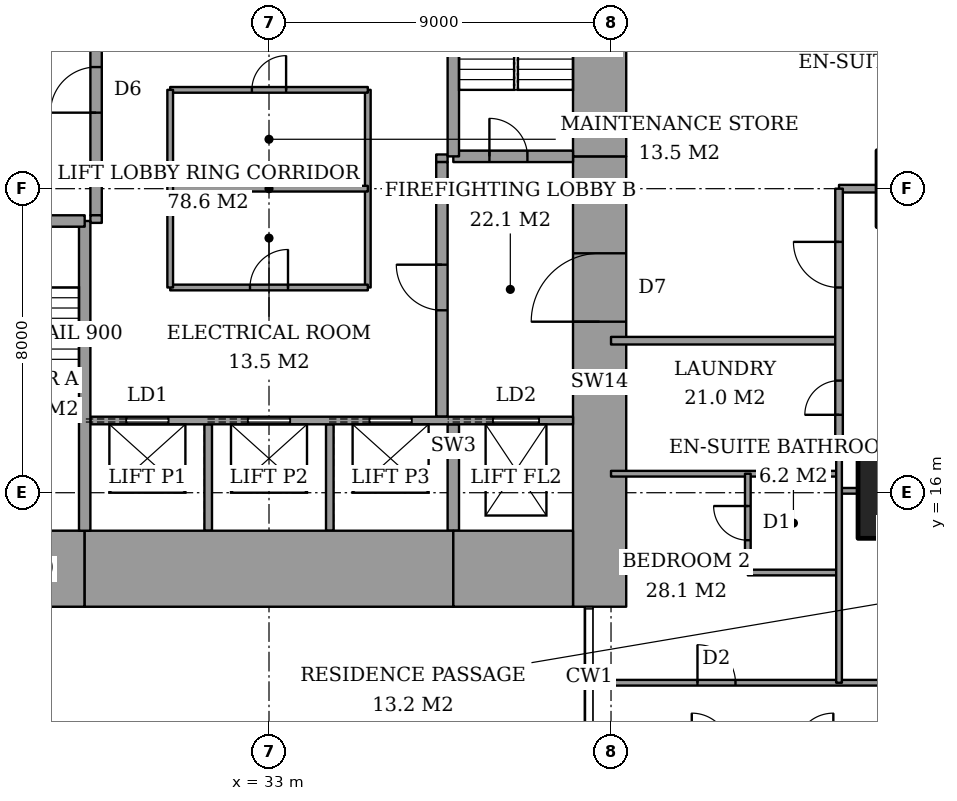
"""IFC4 building model, lengths in metres.
Left out: names, types, materials, properties, quantities, classifications, styles, units other than length and angle.
Written with IfcOpenShell. Run it as: python <this file> out.ifc"""

import sys

from ifc_helpers import new_model, si_unit, direction, frame, frame_2d, origin, origin_2d, place, context, subcontext, project, spatial, rectangle, extrude, element, fill, save


model = new_model("IFC4")
c1 = context("Model", 3, precision=1e-05, world=origin(), true_north=direction((0.0, 1.0)))
c2 = subcontext(c1, "Body", "Model", "MODEL_VIEW")
j1 = project(units=[si_unit("LENGTHUNIT", "METRE"), si_unit("PLANEANGLEUNIT", "RADIAN")], contexts=[c1])
p1 = place(None, origin())
s1 = spatial("IfcSite", under=j1, at=p1, CompositionType="ELEMENT")
p2 = place(p1, origin())
s2 = spatial("IfcBuilding", under=s1, at=p2, CompositionType="ELEMENT")
p3 = place(p2, frame((0.0, 0.0, 117.8)))
s3 = spatial("IfcBuildingStorey", under=s2, at=p3, CompositionType="ELEMENT", Elevation=117.8)
p4 = place(p3, frame((50.0, 16.0, 0.0), z_axis=(0.0, 0.0, 1.0), x_axis=(1.0, 0.0, 0.0)))
e1 = element("IfcColumn", 1, at=p4, inside=s3, PredefinedType="COLUMN", context=c2, shape_type="SweptSolid", body=[
    extrude(rectangle(XDim=3.0, YDim=2.4, at=origin_2d()), origin(), (0.0, 0.0, 1.0), 3.6),
])
p5 = place(p3, frame((25.0, 14.0, 0.0), z_axis=(0.0, 0.0, 1.0), x_axis=(1.0, 0.0, 0.0)))
e2 = element("IfcWall", 2, at=p5, inside=s3, PredefinedType="SHEAR", context=c2, shape_type="SweptSolid", body=[
    extrude(rectangle(XDim=3.15, YDim=2.0, at=frame_2d((1.575, 0.0))), origin(), (0.0, 0.0, 1.0), 3.6),
])
p6 = place(p3, frame((28.15, 14.0, 0.0), z_axis=(0.0, 0.0, 1.0), x_axis=(1.0, 0.0, 0.0)))
e3 = element("IfcWall", 3, at=p6, inside=s3, PredefinedType="SHEAR", context=c2, shape_type="SweptSolid", body=[
    extrude(rectangle(XDim=9.7, YDim=2.0, at=frame_2d((4.85, 0.0))), origin(), (0.0, 0.0, 1.0), 3.6),
])
p7 = place(p3, frame((37.85, 14.0, 0.0), z_axis=(0.0, 0.0, 1.0), x_axis=(1.0, 0.0, 0.0)))
e4 = element("IfcWall", 4, at=p7, inside=s3, PredefinedType="SHEAR", context=c2, shape_type="SweptSolid", body=[
    extrude(rectangle(XDim=3.15, YDim=2.0, at=frame_2d((1.575, 0.0))), origin(), (0.0, 0.0, 1.0), 3.6),
])
p8 = place(p3, frame((41.7, 13.0, 0.0), z_axis=(0.0, 0.0, 1.0), x_axis=(0.0, 1.0, 0.0)))
e5 = element("IfcWall", 5, at=p8, inside=s3, PredefinedType="SHEAR", context=c2, shape_type="SweptSolid", body=[
    extrude(rectangle(XDim=11.85, YDim=1.4, at=frame_2d((5.925, 0.0))), origin(), (0.0, 0.0, 1.0), 3.6),
])
p9 = place(p8, frame((7.5, 0.0, 0.0)))
e6 = element("IfcOpeningElement", 6, at=p9, cuts=e5, PredefinedType="OPENING", context=c2, shape_type="SweptSolid", body=[
    extrude(rectangle(XDim=1.8, YDim=2.4, at=frame_2d((0.9, 1.2))), frame((0.0, 0.71, 0.0), z_axis=(0.0, -1.0, 0.0), x_axis=(1.0, 0.0, 0.0)), (0.0, 0.0, 1.0), 1.42),
])
p10 = place(p3, frame((41.7, 24.85, 0.0), z_axis=(0.0, 0.0, 1.0), x_axis=(0.0, 1.0, 0.0)))
e7 = element("IfcWall", 7, at=p10, inside=s3, PredefinedType="SHEAR", context=c2, shape_type="SweptSolid", body=[
    extrude(rectangle(XDim=10.15, YDim=1.4, at=frame_2d((5.075, 0.0))), origin(), (0.0, 0.0, 1.0), 3.6),
])
p11 = place(p3, frame((28.15, 15.0, 0.0), z_axis=(0.0, 0.0, 1.0), x_axis=(0.0, 1.0, 0.0)))
e8 = element("IfcWall", 8, at=p11, inside=s3, PredefinedType="SHEAR", context=c2, shape_type="SweptSolid", body=[
    extrude(rectangle(XDim=8.15, YDim=0.3, at=frame_2d((4.075, 0.0))), origin(), (0.0, 0.0, 1.0), 3.6),
])
p12 = place(p3, frame((25.0, 23.15, 0.0), z_axis=(0.0, 0.0, 1.0), x_axis=(1.0, 0.0, 0.0)))
e9 = element("IfcWall", 9, at=p12, inside=s3, PredefinedType="SHEAR", context=c2, shape_type="SweptSolid", body=[
    extrude(rectangle(XDim=3.15, YDim=0.3, at=frame_2d((1.575, 0.0))), origin(), (0.0, 0.0, 1.0), 3.6),
])
p13 = place(p12, frame((0.6, 0.0, 0.0)))
e10 = element("IfcOpeningElement", 10, at=p13, cuts=e9, PredefinedType="OPENING", context=c2, shape_type="SweptSolid", body=[
    extrude(rectangle(XDim=1.0, YDim=2.1, at=frame_2d((0.5, 1.05))), frame((0.0, 0.16, 0.0), z_axis=(0.0, -1.0, 0.0), x_axis=(1.0, 0.0, 0.0)), (0.0, 0.0, 1.0), 0.32),
])
p14 = place(p3, frame((37.85, 24.85, 0.0), z_axis=(0.0, 0.0, 1.0), x_axis=(0.0, 1.0, 0.0)))
e11 = element("IfcWall", 11, at=p14, inside=s3, PredefinedType="SHEAR", context=c2, shape_type="SweptSolid", body=[
    extrude(rectangle(XDim=8.15, YDim=0.3, at=frame_2d((4.075, 0.0))), origin(), (0.0, 0.0, 1.0), 3.6),
])
p15 = place(p3, frame((37.85, 24.85, 0.0), z_axis=(0.0, 0.0, 1.0), x_axis=(1.0, 0.0, 0.0)))
e12 = element("IfcWall", 12, at=p15, inside=s3, PredefinedType="SHEAR", context=c2, shape_type="SweptSolid", body=[
    extrude(rectangle(XDim=3.15, YDim=0.3, at=frame_2d((1.575, 0.0))), origin(), (0.0, 0.0, 1.0), 3.6),
])
p16 = place(p15, frame((0.95, 0.0, 0.0)))
e13 = element("IfcOpeningElement", 13, at=p16, cuts=e12, PredefinedType="OPENING", context=c2, shape_type="SweptSolid", body=[
    extrude(rectangle(XDim=1.0, YDim=2.1, at=frame_2d((0.5, 1.05))), frame((0.0, 0.16, 0.0), z_axis=(0.0, -1.0, 0.0), x_axis=(1.0, 0.0, 0.0)), (0.0, 0.0, 1.0), 0.32),
])
p17 = place(p3, frame((28.45, 23.3, 0.0), z_axis=(0.0, 0.0, 1.0), x_axis=(0.0, 1.0, 0.0)))
e14 = element("IfcWall", 14, at=p17, inside=s3, PredefinedType="PARTITIONING", context=c2, shape_type="SweptSolid", body=[
    extrude(rectangle(XDim=6.7, YDim=0.3, at=frame_2d((3.35, 0.0))), origin(), (0.0, 0.0, 1.0), 3.6),
])
p18 = place(p17, frame((2.7, 0.0, 0.0)))
e15 = element("IfcOpeningElement", 15, at=p18, cuts=e14, PredefinedType="OPENING", context=c2, shape_type="SweptSolid", body=[
    extrude(rectangle(XDim=1.2, YDim=2.1, at=frame_2d((0.6, 1.05))), frame((0.0, 0.16, 0.0), z_axis=(0.0, -1.0, 0.0), x_axis=(1.0, 0.0, 0.0)), (0.0, 0.0, 1.0), 0.32),
])
p19 = place(p3, frame((37.55, 18.0, 0.0), z_axis=(0.0, 0.0, 1.0), x_axis=(0.0, 1.0, 0.0)))
e16 = element("IfcWall", 16, at=p19, inside=s3, PredefinedType="PARTITIONING", context=c2, shape_type="SweptSolid", body=[
    extrude(rectangle(XDim=6.7, YDim=0.3, at=frame_2d((3.35, 0.0))), origin(), (0.0, 0.0, 1.0), 3.6),
])
p20 = place(p19, frame((2.8, 0.0, 0.0)))
e17 = element("IfcOpeningElement", 17, at=p20, cuts=e16, PredefinedType="OPENING", context=c2, shape_type="SweptSolid", body=[
    extrude(rectangle(XDim=1.2, YDim=2.1, at=frame_2d((0.6, 1.05))), frame((0.0, 0.16, 0.0), z_axis=(0.0, -1.0, 0.0), x_axis=(1.0, 0.0, 0.0)), (0.0, 0.0, 1.0), 0.32),
])
p21 = place(p3, frame((41.439, 11.0, 0.0), z_axis=(0.0, 0.0, 1.0), x_axis=(1.0, 0.0, 0.0)))
e18 = element("IfcWall", 18, at=p21, inside=s3, PredefinedType="PARTITIONING", context=c2, shape_type="SweptSolid", body=[
    extrude(rectangle(XDim=25.011, YDim=0.15, at=frame_2d((12.505, 0.0))), origin(), (0.0, 0.0, 1.0), 3.35),
])
p22 = place(p21, frame((12.561, 0.0, 0.0)))
e19 = element("IfcOpeningElement", 19, at=p22, cuts=e18, PredefinedType="OPENING", context=c2, shape_type="SweptSolid", body=[
    extrude(rectangle(XDim=1.0, YDim=2.1, at=frame_2d((0.5, 1.05))), frame((0.0, 0.085, 0.0), z_axis=(0.0, -1.0, 0.0), x_axis=(1.0, 0.0, 0.0)), (0.0, 0.0, 1.0), 0.17),
])
p23 = place(p21, frame((20.924, 0.0, 0.0)))
e20 = element("IfcOpeningElement", 20, at=p23, cuts=e18, PredefinedType="OPENING", context=c2, shape_type="SweptSolid", body=[
    extrude(rectangle(XDim=1.0, YDim=2.1, at=frame_2d((0.5, 1.05))), frame((0.0, 0.085, 0.0), z_axis=(0.0, -1.0, 0.0), x_axis=(1.0, 0.0, 0.0)), (0.0, 0.0, 1.0), 0.17),
])
p24 = place(p21, frame((15.499, 0.0, 0.0)))
e21 = element("IfcOpeningElement", 21, at=p24, cuts=e18, PredefinedType="OPENING", context=c2, shape_type="SweptSolid", body=[
    extrude(rectangle(XDim=1.0, YDim=2.1, at=frame_2d((0.5, 1.05))), frame((0.0, 0.085, 0.0), z_axis=(0.0, -1.0, 0.0), x_axis=(1.0, 0.0, 0.0)), (0.0, 0.0, 1.0), 0.17),
])
p25 = place(p21, frame((8.761, 0.0, 0.0)))
e22 = element("IfcOpeningElement", 22, at=p25, cuts=e18, PredefinedType="OPENING", context=c2, shape_type="SweptSolid", body=[
    extrude(rectangle(XDim=1.0, YDim=2.1, at=frame_2d((0.5, 1.05))), frame((0.0, 0.085, 0.0), z_axis=(0.0, -1.0, 0.0), x_axis=(1.0, 0.0, 0.0)), (0.0, 0.0, 1.0), 0.17),
])
p26 = place(p21, frame((2.836, 0.0, 0.0)))
e23 = element("IfcOpeningElement", 23, at=p26, cuts=e18, PredefinedType="OPENING", context=c2, shape_type="SweptSolid", body=[
    extrude(rectangle(XDim=1.0, YDim=2.1, at=frame_2d((0.5, 1.05))), frame((0.0, 0.085, 0.0), z_axis=(0.0, -1.0, 0.0), x_axis=(1.0, 0.0, 0.0)), (0.0, 0.0, 1.0), 0.17),
])
p27 = place(p3, frame((45.6, 13.9, 0.0), z_axis=(0.0, 0.0, 1.0), x_axis=(1.0, 0.0, 0.0)))
e24 = element("IfcWall", 24, at=p27, inside=s3, PredefinedType="PARTITIONING", context=c2, shape_type="SweptSolid", body=[
    extrude(rectangle(XDim=2.4, YDim=0.15, at=frame_2d((1.2, 0.0))), origin(), (0.0, 0.0, 1.0), 3.35),
])
p28 = place(p3, frame((48.0, 16.05, 0.0), z_axis=(0.0, 0.0, 1.0), x_axis=(1.0, 0.0, 0.0)))
e25 = element("IfcWall", 25, at=p28, inside=s3, PredefinedType="PARTITIONING", context=c2, shape_type="SweptSolid", body=[
    extrude(rectangle(XDim=0.5, YDim=0.15, at=frame_2d((0.25, 0.0))), origin(), (0.0, 0.0, 1.0), 2.634),
])
p29 = place(p3, frame((42.0, 16.5, 0.0), z_axis=(0.0, 0.0, 1.0), x_axis=(1.0, 0.0, 0.0)))
e26 = element("IfcWall", 26, at=p29, inside=s3, PredefinedType="PARTITIONING", context=c2, shape_type="SweptSolid", body=[
    extrude(rectangle(XDim=6.0, YDim=0.15, at=frame_2d((3.0, 0.0))), origin(), (0.0, 0.0, 1.0), 3.35),
])
p30 = place(p3, frame((42.0, 20.0, 0.0), z_axis=(0.0, 0.0, 1.0), x_axis=(1.0, 0.0, 0.0)))
e27 = element("IfcWall", 27, at=p30, inside=s3, PredefinedType="PARTITIONING", context=c2, shape_type="SweptSolid", body=[
    extrude(rectangle(XDim=6.0, YDim=0.2, at=frame_2d((3.0, 0.0))), origin(), (0.0, 0.0, 1.0), 3.35),
])
p31 = place(p3, frame((48.0, 24.0, 0.0), z_axis=(0.0, 0.0, 1.0), x_axis=(1.0, 0.0, 0.0)))
e28 = element("IfcWall", 28, at=p31, inside=s3, PredefinedType="PARTITIONING", context=c2, shape_type="SweptSolid", body=[
    extrude(rectangle(XDim=1.0, YDim=0.2, at=frame_2d((0.5, 0.0))), origin(), (0.0, 0.0, 1.0), 3.35),
])
p32 = place(p3, frame((45.6, 13.9, 0.0), z_axis=(0.0, 0.0, 1.0), x_axis=(0.0, 1.0, 0.0)))
e29 = element("IfcWall", 29, at=p32, inside=s3, PredefinedType="PARTITIONING", context=c2, shape_type="SweptSolid", body=[
    extrude(rectangle(XDim=2.6, YDim=0.15, at=frame_2d((1.3, 0.0))), origin(), (0.0, 0.0, 1.0), 3.35),
])
p33 = place(p32, frame((0.85, 0.0, 0.0)))
e30 = element("IfcOpeningElement", 30, at=p33, cuts=e29, PredefinedType="OPENING", context=c2, shape_type="SweptSolid", body=[
    extrude(rectangle(XDim=0.9, YDim=2.1, at=frame_2d((0.45, 1.05))), frame((0.0, 0.085, 0.0), z_axis=(0.0, -1.0, 0.0), x_axis=(1.0, 0.0, 0.0)), (0.0, 0.0, 1.0), 0.17),
])
p34 = place(p3, frame((48.0, 17.0, 0.0), z_axis=(0.0, 0.0, 1.0), x_axis=(0.0, 1.0, 0.0)))
e31 = element("IfcWall", 31, at=p34, inside=s3, PredefinedType="PARTITIONING", context=c2, shape_type="SweptSolid", body=[
    extrude(rectangle(XDim=7.0, YDim=0.2, at=frame_2d((3.5, 0.0))), origin(), (0.0, 0.0, 1.0), 3.35),
])
p35 = place(p34, frame((4.4, 0.0, 0.0)))
e32 = element("IfcOpeningElement", 32, at=p35, cuts=e31, PredefinedType="OPENING", context=c2, shape_type="SweptSolid", body=[
    extrude(rectangle(XDim=1.2, YDim=2.4, at=frame_2d((0.6, 1.2))), frame((0.0, 0.11, 0.0), z_axis=(0.0, -1.0, 0.0), x_axis=(1.0, 0.0, 0.0)), (0.0, 0.0, 1.0), 0.22),
])
p36 = place(p34, frame((1.05, 0.0, 0.0)))
e33 = element("IfcOpeningElement", 33, at=p36, cuts=e31, PredefinedType="OPENING", context=c2, shape_type="SweptSolid", body=[
    extrude(rectangle(XDim=0.9, YDim=2.1, at=frame_2d((0.45, 1.05))), frame((0.0, 0.11, 0.0), z_axis=(0.0, -1.0, 0.0), x_axis=(1.0, 0.0, 0.0)), (0.0, 0.0, 1.0), 0.22),
])
p37 = place(p3, frame((48.0, 11.0, 0.0), z_axis=(0.0, 0.0, 1.0), x_axis=(0.0, 1.0, 0.0)))
e34 = element("IfcWall", 34, at=p37, inside=s3, PredefinedType="PARTITIONING", context=c2, shape_type="SweptSolid", body=[
    extrude(rectangle(XDim=6.0, YDim=0.15, at=frame_2d((3.0, 0.0))), origin(), (0.0, 0.0, 1.0), 3.35),
])
p38 = place(p3, frame((28.3, 17.9, 0.0), z_axis=(0.0, 0.0, 1.0), x_axis=(1.0, 0.0, 0.0)))
e35 = element("IfcWall", 35, at=p38, inside=s3, PredefinedType="PARTITIONING", context=c2, shape_type="SweptSolid", body=[
    extrude(rectangle(XDim=12.7, YDim=0.2, at=frame_2d((6.35, 0.0))), origin(), (0.0, 0.0, 1.0), 3.6),
])
p39 = place(p38, frame((0.95, 0.0, 0.0)))
e36 = element("IfcOpeningElement", 36, at=p39, cuts=e35, PredefinedType="OPENING", context=c2, shape_type="SweptSolid", body=[
    extrude(rectangle(XDim=1.1, YDim=2.1, at=frame_2d((0.55, 1.05))), frame((0.0, 0.11, 0.0), z_axis=(0.0, -1.0, 0.0), x_axis=(1.0, 0.0, 0.0)), (0.0, 0.0, 1.0), 0.22),
])
p40 = place(p38, frame((4.15, 0.0, 0.0)))
e37 = element("IfcOpeningElement", 37, at=p40, cuts=e35, PredefinedType="OPENING", context=c2, shape_type="SweptSolid", body=[
    extrude(rectangle(XDim=1.1, YDim=2.1, at=frame_2d((0.55, 1.05))), frame((0.0, 0.11, 0.0), z_axis=(0.0, -1.0, 0.0), x_axis=(1.0, 0.0, 0.0)), (0.0, 0.0, 1.0), 0.22),
])
p41 = place(p38, frame((7.35, 0.0, 0.0)))
e38 = element("IfcOpeningElement", 38, at=p41, cuts=e35, PredefinedType="OPENING", context=c2, shape_type="SweptSolid", body=[
    extrude(rectangle(XDim=1.1, YDim=2.1, at=frame_2d((0.55, 1.05))), frame((0.0, 0.11, 0.0), z_axis=(0.0, -1.0, 0.0), x_axis=(1.0, 0.0, 0.0)), (0.0, 0.0, 1.0), 0.22),
])
p42 = place(p38, frame((10.6, 0.0, 0.0)))
e39 = element("IfcOpeningElement", 39, at=p42, cuts=e35, PredefinedType="OPENING", context=c2, shape_type="SweptSolid", body=[
    extrude(rectangle(XDim=1.2, YDim=2.1, at=frame_2d((0.6, 1.05))), frame((0.0, 0.11, 0.0), z_axis=(0.0, -1.0, 0.0), x_axis=(1.0, 0.0, 0.0)), (0.0, 0.0, 1.0), 0.22),
])
for number, where, z_axis, x_axis in (
    (40, (31.4, 15.0, 0.0), (0.0, 0.0, 1.0), (0.0, 1.0, 0.0)),
    (41, (34.6, 15.0, 0.0), (0.0, 0.0, 1.0), (0.0, 1.0, 0.0)),
):
    element("IfcWall", number, at=place(p3, frame(where, z_axis=z_axis, x_axis=x_axis)), inside=s3, PredefinedType="PARTITIONING", context=c2, shape_type="SweptSolid", body=[
        extrude(rectangle(XDim=2.8, YDim=0.2, at=frame_2d((1.4, 0.0))), origin(), (0.0, 0.0, 1.0), 3.6),
    ])
p43 = place(p3, frame((37.85, 15.0, 0.0), z_axis=(0.0, 0.0, 1.0), x_axis=(0.0, 1.0, 0.0)))
e42 = element("IfcWall", 42, at=p43, inside=s3, PredefinedType="SHEAR", context=c2, shape_type="SweptSolid", body=[
    extrude(rectangle(XDim=2.8, YDim=0.3, at=frame_2d((1.4, 0.0))), origin(), (0.0, 0.0, 1.0), 3.6),
])
for number, where, z_axis, x_axis in (
    (43, (28.3, 23.2, 0.0), (0.0, 0.0, 1.0), (1.0, 0.0, 0.0)),
    (44, (37.4, 24.8, 0.0), (0.0, 0.0, 1.0), (1.0, 0.0, 0.0)),
):
    element("IfcWall", number, at=place(p3, frame(where, z_axis=z_axis, x_axis=x_axis)), inside=s3, PredefinedType="PARTITIONING", context=c2, shape_type="SweptSolid", body=[
        extrude(rectangle(XDim=0.3, YDim=0.2, at=frame_2d((0.15, 0.0))), origin(), (0.0, 0.0, 1.0), 3.6),
    ])
p44 = place(p3, frame((30.4, 21.4, 0.0), z_axis=(0.0, 0.0, 1.0), x_axis=(1.0, 0.0, 0.0)))
e45 = element("IfcWall", 45, at=p44, inside=s3, PredefinedType="PARTITIONING", context=c2, shape_type="SweptSolid", body=[
    extrude(rectangle(XDim=5.2, YDim=0.15, at=frame_2d((2.6, 0.0))), origin(), (0.0, 0.0, 1.0), 3.35),
])
p45 = place(p44, frame((2.1, 0.0, 0.0)))
e46 = element("IfcOpeningElement", 46, at=p45, cuts=e45, PredefinedType="OPENING", context=c2, shape_type="SweptSolid", body=[
    extrude(rectangle(XDim=1.0, YDim=2.1, at=frame_2d((0.5, 1.05))), frame((0.0, 0.085, 0.0), z_axis=(0.0, -1.0, 0.0), x_axis=(1.0, 0.0, 0.0)), (0.0, 0.0, 1.0), 0.17),
])
p46 = place(p3, frame((30.4, 26.6, 0.0), z_axis=(0.0, 0.0, 1.0), x_axis=(1.0, 0.0, 0.0)))
e47 = element("IfcWall", 47, at=p46, inside=s3, PredefinedType="PARTITIONING", context=c2, shape_type="SweptSolid", body=[
    extrude(rectangle(XDim=5.2, YDim=0.15, at=frame_2d((2.6, 0.0))), origin(), (0.0, 0.0, 1.0), 3.35),
])
p47 = place(p46, frame((2.15, 0.0, 0.0)))
e48 = element("IfcOpeningElement", 48, at=p47, cuts=e47, PredefinedType="OPENING", context=c2, shape_type="SweptSolid", body=[
    extrude(rectangle(XDim=0.9, YDim=2.1, at=frame_2d((0.45, 1.05))), frame((0.0, 0.085, 0.0), z_axis=(0.0, -1.0, 0.0), x_axis=(1.0, 0.0, 0.0)), (0.0, 0.0, 1.0), 0.17),
])
for number, where, z_axis, x_axis in (
    (49, (30.4, 21.4, 0.0), (0.0, 0.0, 1.0), (0.0, 1.0, 0.0)),
    (50, (35.6, 21.4, 0.0), (0.0, 0.0, 1.0), (0.0, 1.0, 0.0)),
    (51, (30.4, 24.0, 0.0), (0.0, 0.0, 1.0), (1.0, 0.0, 0.0)),
):
    element("IfcWall", number, at=place(p3, frame(where, z_axis=z_axis, x_axis=x_axis)), inside=s3, PredefinedType="PARTITIONING", context=c2, shape_type="SweptSolid", body=[
        extrude(rectangle(XDim=5.2, YDim=0.15, at=frame_2d((2.6, 0.0))), origin(), (0.0, 0.0, 1.0), 3.35),
    ])
p48 = place(p35, origin())
e52 = element("IfcDoor", 52, at=p48, inside=s3, OperationType="SINGLE_SWING_LEFT", PredefinedType="DOOR", context=c2, shape_type="SweptSolid", body=[
    extrude(rectangle(XDim=1.2, YDim=2.4, at=frame_2d((0.6, 1.2))), frame((0.0, 0.025, 0.0), z_axis=(0.0, -1.0, 0.0), x_axis=(1.0, 0.0, 0.0)), (0.0, 0.0, 1.0), 0.05),
])
fill(e32, e52)
p49 = place(p33, origin())
e53 = element("IfcDoor", 53, at=p49, inside=s3, OperationType="SINGLE_SWING_LEFT", PredefinedType="DOOR", context=c2, shape_type="SweptSolid", body=[
    extrude(rectangle(XDim=0.9, YDim=2.1, at=frame_2d((0.45, 1.05))), frame((0.0, 0.025, 0.0), z_axis=(0.0, -1.0, 0.0), x_axis=(1.0, 0.0, 0.0)), (0.0, 0.0, 1.0), 0.05),
])
fill(e30, e53)
p50 = place(p26, origin())
e54 = element("IfcDoor", 54, at=p50, inside=s3, OperationType="SINGLE_SWING_RIGHT", PredefinedType="DOOR", context=c2, shape_type="SweptSolid", body=[
    extrude(rectangle(XDim=1.0, YDim=2.1, at=frame_2d((0.5, 1.05))), frame((0.0, 0.025, 0.0), z_axis=(0.0, -1.0, 0.0), x_axis=(1.0, 0.0, 0.0)), (0.0, 0.0, 1.0), 0.05),
])
fill(e23, e54)
p51 = place(p36, origin())
e55 = element("IfcDoor", 55, at=p51, inside=s3, OperationType="SINGLE_SWING_RIGHT", PredefinedType="DOOR", context=c2, shape_type="SweptSolid", body=[
    extrude(rectangle(XDim=0.9, YDim=2.1, at=frame_2d((0.45, 1.05))), frame((0.0, 0.025, 0.0), z_axis=(0.0, -1.0, 0.0), x_axis=(1.0, 0.0, 0.0)), (0.0, 0.0, 1.0), 0.05),
])
fill(e33, e55)
p52 = place(p16, origin())
e56 = element("IfcDoor", 56, at=p52, inside=s3, OperationType="SINGLE_SWING_RIGHT", PredefinedType="DOOR", context=c2, shape_type="SweptSolid", body=[
    extrude(rectangle(XDim=1.0, YDim=2.1, at=frame_2d((0.5, 1.05))), frame((0.0, 0.025, 0.0), z_axis=(0.0, -1.0, 0.0), x_axis=(1.0, 0.0, 0.0)), (0.0, 0.0, 1.0), 0.05),
])
fill(e13, e56)
p53 = place(p18, origin())
e57 = element("IfcDoor", 57, at=p53, inside=s3, OperationType="SINGLE_SWING_RIGHT", PredefinedType="DOOR", context=c2, shape_type="SweptSolid", body=[
    extrude(rectangle(XDim=1.2, YDim=2.1, at=frame_2d((0.6, 1.05))), frame((0.0, 0.025, 0.0), z_axis=(0.0, -1.0, 0.0), x_axis=(1.0, 0.0, 0.0)), (0.0, 0.0, 1.0), 0.05),
])
fill(e15, e57)
p54 = place(p20, origin())
e58 = element("IfcDoor", 58, at=p54, inside=s3, OperationType="SINGLE_SWING_LEFT", PredefinedType="DOOR", context=c2, shape_type="SweptSolid", body=[
    extrude(rectangle(XDim=1.2, YDim=2.1, at=frame_2d((0.6, 1.05))), frame((0.0, 0.025, 0.0), z_axis=(0.0, -1.0, 0.0), x_axis=(1.0, 0.0, 0.0)), (0.0, 0.0, 1.0), 0.05),
])
fill(e17, e58)
p55 = place(p9, origin())
e59 = element("IfcDoor", 59, at=p55, inside=s3, OperationType="DOUBLE_DOOR_DOUBLE_SWING", PredefinedType="DOOR", context=c2, shape_type="SweptSolid", body=[
    extrude(rectangle(XDim=1.8, YDim=2.4, at=frame_2d((0.9, 1.2))), frame((0.0, 0.025, 0.0), z_axis=(0.0, -1.0, 0.0), x_axis=(1.0, 0.0, 0.0)), (0.0, 0.0, 1.0), 0.05),
])
fill(e6, e59)
p56 = place(p45, origin())
e60 = element("IfcDoor", 60, at=p56, inside=s3, OperationType="SINGLE_SWING_LEFT", PredefinedType="DOOR", context=c2, shape_type="SweptSolid", body=[
    extrude(rectangle(XDim=1.0, YDim=2.1, at=frame_2d((0.5, 1.05))), frame((0.0, 0.025, 0.0), z_axis=(0.0, -1.0, 0.0), x_axis=(1.0, 0.0, 0.0)), (0.0, 0.0, 1.0), 0.05),
])
fill(e46, e60)
p57 = place(p47, origin())
e61 = element("IfcDoor", 61, at=p57, inside=s3, OperationType="SINGLE_SWING_LEFT", PredefinedType="DOOR", context=c2, shape_type="SweptSolid", body=[
    extrude(rectangle(XDim=0.9, YDim=2.1, at=frame_2d((0.45, 1.05))), frame((0.0, 0.025, 0.0), z_axis=(0.0, -1.0, 0.0), x_axis=(1.0, 0.0, 0.0)), (0.0, 0.0, 1.0), 0.05),
])
fill(e48, e61)
p58 = place(p39, origin())
e62 = element("IfcDoor", 62, at=p58, inside=s3, OperationType="SLIDING_TO_LEFT", PredefinedType="DOOR", context=c2, shape_type="SweptSolid", body=[
    extrude(rectangle(XDim=1.1, YDim=2.1, at=frame_2d((0.55, 1.05))), frame((0.0, 0.025, 0.0), z_axis=(0.0, -1.0, 0.0), x_axis=(1.0, 0.0, 0.0)), (0.0, 0.0, 1.0), 0.05),
])
fill(e36, e62)
p59 = place(p40, origin())
e63 = element("IfcDoor", 63, at=p59, inside=s3, OperationType="SLIDING_TO_LEFT", PredefinedType="DOOR", context=c2, shape_type="SweptSolid", body=[
    extrude(rectangle(XDim=1.1, YDim=2.1, at=frame_2d((0.55, 1.05))), frame((0.0, 0.025, 0.0), z_axis=(0.0, -1.0, 0.0), x_axis=(1.0, 0.0, 0.0)), (0.0, 0.0, 1.0), 0.05),
])
fill(e37, e63)
p60 = place(p41, origin())
e64 = element("IfcDoor", 64, at=p60, inside=s3, OperationType="SLIDING_TO_LEFT", PredefinedType="DOOR", context=c2, shape_type="SweptSolid", body=[
    extrude(rectangle(XDim=1.1, YDim=2.1, at=frame_2d((0.55, 1.05))), frame((0.0, 0.025, 0.0), z_axis=(0.0, -1.0, 0.0), x_axis=(1.0, 0.0, 0.0)), (0.0, 0.0, 1.0), 0.05),
])
fill(e38, e64)
p61 = place(p42, origin())
e65 = element("IfcDoor", 65, at=p61, inside=s3, OperationType="SLIDING_TO_LEFT", PredefinedType="DOOR", context=c2, shape_type="SweptSolid", body=[
    extrude(rectangle(XDim=1.2, YDim=2.1, at=frame_2d((0.6, 1.05))), frame((0.0, 0.025, 0.0), z_axis=(0.0, -1.0, 0.0), x_axis=(1.0, 0.0, 0.0)), (0.0, 0.0, 1.0), 0.05),
])
fill(e39, e65)
save(model, sys.argv[1])
